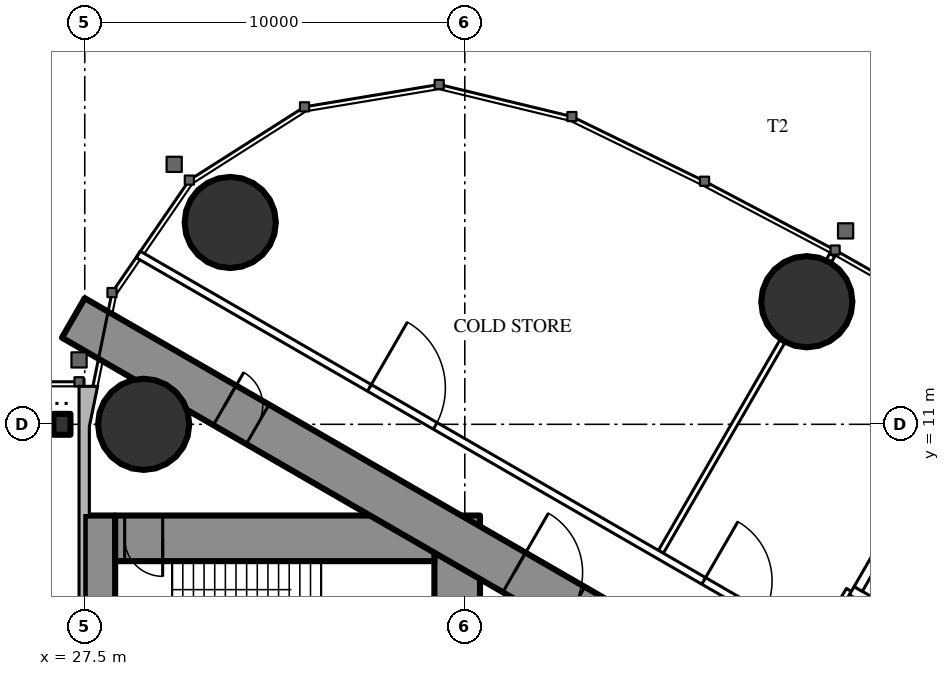
"""IFC4 building model, lengths in metres.
Left out: names, types, materials, properties, quantities, classifications, styles, units other than length and angle.
Written with IfcOpenShell. Run it as: python <this file> out.ifc"""

import sys

from ifc_helpers import new_model, si_unit, direction, frame, frame_2d, origin, origin_2d, place, context, subcontext, project, spatial, rectangle, circle, i_section, extrude, element, fill, save


model = new_model("IFC4")
c1 = context("Model", 3, precision=1e-05, world=origin(), true_north=direction((0.0, 1.0)))
c2 = subcontext(c1, "Body", "Model", "MODEL_VIEW")
j1 = project(units=[si_unit("LENGTHUNIT", "METRE"), si_unit("PLANEANGLEUNIT", "RADIAN")], contexts=[c1])
p1 = place(None, origin())
s1 = spatial("IfcSite", under=j1, at=p1, CompositionType="ELEMENT")
p2 = place(p1, origin())
s2 = spatial("IfcBuilding", under=s1, at=p2, CompositionType="ELEMENT")
p3 = place(p2, frame((0.0, 0.0, 251.9)))
s3 = spatial("IfcBuildingStorey", under=s2, at=p3, CompositionType="ELEMENT", Elevation=251.9)
for number, where, z_axis, x_axis in (
    (1, (31.328, 16.311, 0.0), (0.0, 0.0, 1.0), (1.0, 0.0, 0.0)),
    (2, (29.05, 11.0, 0.0), (0.0, 0.0, 1.0), (1.0, 0.0, 0.0)),
    (3, (46.499, 14.226, 0.0), (0.0, 0.0, 1.0), (1.0, 0.0, 0.0)),
):
    element("IfcColumn", number, at=place(p3, frame(where, z_axis=z_axis, x_axis=x_axis)), inside=s3, PredefinedType="COLUMN", context=c2, shape_type="SweptSolid", body=[
        extrude(circle(Radius=1.2, at=origin_2d()), origin(), (0.0, 0.0, 1.0), 5.4),
    ])
p4 = place(p3, frame((27.9, -8.6, 0.0), z_axis=(0.0, 0.0, 1.0), x_axis=(0.0, 1.0, 0.0)))
e4 = element("IfcWall", 4, at=p4, inside=s3, PredefinedType="SHEAR", context=c2, shape_type="SweptSolid", body=[
    extrude(rectangle(XDim=17.2, YDim=0.8, at=frame_2d((8.6, 0.0))), origin(), (0.0, 0.0, 1.0), 5.4),
])
p5 = place(p4, frame((9.35, 0.0, 0.0)))
e5 = element("IfcOpeningElement", 5, at=p5, cuts=e4, PredefinedType="OPENING", context=c2, shape_type="SweptSolid", body=[
    extrude(rectangle(XDim=0.9, YDim=2.2, at=frame_2d((0.45, 1.1))), frame((0.0, 0.41, 0.0), z_axis=(0.0, -1.0, 0.0), x_axis=(1.0, 0.0, 0.0)), (0.0, 0.0, 1.0), 0.82),
])
p6 = place(p3, frame((37.3, -8.6, 0.0), z_axis=(0.0, 0.0, 1.0), x_axis=(0.0, 1.0, 0.0)))
e6 = element("IfcWall", 6, at=p6, inside=s3, PredefinedType="SHEAR", context=c2, shape_type="SweptSolid", body=[
    extrude(rectangle(XDim=17.2, YDim=1.2, at=frame_2d((8.6, 0.0))), origin(), (0.0, 0.0, 1.0), 5.4),
])
p7 = place(p6, frame((7.7, 0.0, 0.0)))
e7 = element("IfcOpeningElement", 7, at=p7, cuts=e6, PredefinedType="OPENING", context=c2, shape_type="SweptSolid", body=[
    extrude(rectangle(XDim=1.8, YDim=2.2, at=frame_2d((0.9, 1.1))), frame((0.0, 0.61, 0.0), z_axis=(0.0, -1.0, 0.0), x_axis=(1.0, 0.0, 0.0)), (0.0, 0.0, 1.0), 1.22),
])
p8 = place(p3, frame((28.3, 8.0, 0.0), z_axis=(0.0, 0.0, 1.0), x_axis=(1.0, 0.0, 0.0)))
e8 = element("IfcWall", 8, at=p8, inside=s3, PredefinedType="SHEAR", context=c2, shape_type="SweptSolid", body=[
    extrude(rectangle(XDim=8.4, YDim=1.2, at=frame_2d((4.2, 0.0))), origin(), (0.0, 0.0, 1.0), 5.4),
])
p9 = place(p8, frame((0.25, 0.0, 0.0)))
e9 = element("IfcOpeningElement", 9, at=p9, cuts=e8, PredefinedType="OPENING", context=c2, shape_type="SweptSolid", body=[
    extrude(rectangle(XDim=1.0, YDim=2.2, at=frame_2d((0.5, 1.1))), frame((0.0, 0.61, 0.0), z_axis=(0.0, -1.0, 0.0), x_axis=(1.0, 0.0, 0.0)), (0.0, 0.0, 1.0), 1.22),
])
p10 = place(p3, frame((27.2, 13.8, 0.0), z_axis=(0.0, 0.0, 1.0), x_axis=(0.866024515034, -0.500001539357, 0.0)))
e10 = element("IfcWall", 10, at=p10, inside=s3, PredefinedType="SHEAR", context=c2, shape_type="SweptSolid", body=[
    extrude(rectangle(XDim=26.907, YDim=1.2, at=frame_2d((13.454, 0.0))), origin(), (0.0, 0.0, 1.0), 5.4),
])
p11 = place(p10, frame((4.6, 0.0, 0.0)))
e11 = element("IfcOpeningElement", 11, at=p11, cuts=e10, PredefinedType="OPENING", context=c2, shape_type="SweptSolid", body=[
    extrude(rectangle(XDim=1.0, YDim=2.2, at=frame_2d((0.5, 1.1))), frame((0.0, 0.61, 0.0), z_axis=(0.0, -1.0, 0.0), x_axis=(1.0, 0.0, 0.0)), (0.0, 0.0, 1.0), 1.22),
])
p12 = place(p10, frame((13.395, 0.0, 0.0)))
e12 = element("IfcOpeningElement", 12, at=p12, cuts=e10, PredefinedType="OPENING", context=c2, shape_type="SweptSolid", body=[
    extrude(rectangle(XDim=1.8, YDim=2.2, at=frame_2d((0.9, 1.1))), frame((0.0, 0.61, 0.0), z_axis=(0.0, -1.0, 0.0), x_axis=(1.0, 0.0, 0.0)), (0.0, 0.0, 1.0), 1.22),
])
p13 = place(p3, frame((26.9, 11.0, 0.0), z_axis=(0.0, 0.0, 1.0), x_axis=(1.0, 0.0, 0.0)))
e13 = element("IfcColumn", 13, at=p13, inside=s3, PredefinedType="COLUMN", context=c2, shape_type="SweptSolid", body=[
    extrude(i_section(OverallWidth=0.448, OverallDepth=0.55, WebThickness=0.072, FlangeThickness=0.115, FilletRadius=0.02, at=origin_2d()), origin(), (0.0, 0.0, 1.0), 5.4),
])
p14 = place(p3, frame((42.66, 7.646, 0.0), z_axis=(0.0, 0.0, 1.0), x_axis=(0.499996592859, 0.866027370889, 0.0)))
e14 = element("IfcWall", 14, at=p14, inside=s3, PredefinedType="PARTITIONING", context=c2, shape_type="SweptSolid", body=[
    extrude(rectangle(XDim=6.398, YDim=0.15, at=frame_2d((3.199, 0.0))), origin(), (0.0, 0.0, 1.0), 4.25),
])
p15 = place(p3, frame((47.079, 15.3, 0.0), z_axis=(0.0, 0.0, 1.0), x_axis=(0.499212083968, 0.866479829667, 0.0)))
e15 = element("IfcWall", 15, at=p15, inside=s3, PredefinedType="PARTITIONING", context=c2, shape_type="SweptSolid", body=[
    extrude(rectangle(XDim=0.179, YDim=0.15, at=frame_2d((0.09, 0.0))), origin(), (0.0, 0.0, 1.0), 4.25),
])
p16 = place(p3, frame((28.907, 15.47, 0.0), z_axis=(0.0, 0.0, 1.0), x_axis=(0.866026627509, -0.499997880441, 0.0)))
e16 = element("IfcWall", 16, at=p16, inside=s3, PredefinedType="PARTITIONING", context=c2, shape_type="SweptSolid", body=[
    extrude(rectangle(XDim=20.563, YDim=0.2, at=frame_2d((10.282, 0.0))), origin(), (0.0, 0.0, 1.0), 5.15),
])
p17 = place(p16, frame((17.181, 0.0, 0.0)))
e17 = element("IfcOpeningElement", 17, at=p17, cuts=e16, PredefinedType="OPENING", context=c2, shape_type="SweptSolid", body=[
    extrude(rectangle(XDim=1.8, YDim=2.2, at=frame_2d((0.9, 1.1))), frame((0.0, 0.11, 0.0), z_axis=(0.0, -1.0, 0.0), x_axis=(1.0, 0.0, 0.0)), (0.0, 0.0, 1.0), 0.22),
])
p18 = place(p16, frame((7.024, 0.0, 0.0)))
e18 = element("IfcOpeningElement", 18, at=p18, cuts=e16, PredefinedType="OPENING", context=c2, shape_type="SweptSolid", body=[
    extrude(rectangle(XDim=2.0, YDim=2.4, at=frame_2d((1.0, 1.2))), frame((0.0, 0.11, 0.0), z_axis=(0.0, -1.0, 0.0), x_axis=(1.0, 0.0, 0.0)), (0.0, 0.0, 1.0), 0.22),
])
p19 = place(p3, frame((47.606, 6.642, 0.0), z_axis=(0.0, 0.0, 1.0), x_axis=(-0.51353662755, -0.858067673418, 0.0)))
e19 = element("IfcWall", 19, at=p19, inside=s3, PredefinedType="PARTITIONING", context=c2, shape_type="SweptSolid", body=[
    extrude(rectangle(XDim=1.91, YDim=0.15, at=frame_2d((0.955, 0.0))), origin(), (0.0, 0.0, 1.0), 5.15),
])
p20 = place(p3, frame((47.681, 6.622, 0.0), z_axis=(0.0, 0.0, 1.0), x_axis=(0.86603344179, -0.499986077507, 0.0)))
e20 = element("IfcWall", 20, at=p20, inside=s3, PredefinedType="PARTITIONING", context=c2, shape_type="SweptSolid", body=[
    extrude(rectangle(XDim=6.6, YDim=0.25, at=frame_2d((3.3, 0.0))), origin(), (0.0, 0.0, 1.0), 5.15),
])
p21 = place(p3, frame((47.852, 6.668, 0.0), z_axis=(0.0, 0.0, 1.0), x_axis=(0.499929347863, 0.866066190972, 0.0)))
e21 = element("IfcWall", 21, at=p21, inside=s3, PredefinedType="PARTITIONING", context=c2, shape_type="SweptSolid", body=[
    extrude(rectangle(XDim=3.201, YDim=0.25, at=frame_2d((1.6, 0.0))), origin(), (0.0, 0.0, 1.0), 5.15),
])
p22 = place(p17, origin())
e22 = element("IfcDoor", 22, at=p22, inside=s3, OperationType="DOUBLE_DOOR_SINGLE_SWING", PredefinedType="DOOR", context=c2, shape_type="SweptSolid", body=[
    extrude(rectangle(XDim=1.8, YDim=2.2, at=frame_2d((0.9, 1.1))), frame((0.0, 0.025, 0.0), z_axis=(0.0, -1.0, 0.0), x_axis=(1.0, 0.0, 0.0)), (0.0, 0.0, 1.0), 0.05),
])
fill(e17, e22)
p23 = place(p18, origin())
e23 = element("IfcDoor", 23, at=p23, inside=s3, OperationType="DOUBLE_DOOR_SINGLE_SWING", PredefinedType="DOOR", context=c2, shape_type="SweptSolid", body=[
    extrude(rectangle(XDim=2.0, YDim=2.4, at=frame_2d((1.0, 1.2))), frame((0.0, 0.025, 0.0), z_axis=(0.0, -1.0, 0.0), x_axis=(1.0, 0.0, 0.0)), (0.0, 0.0, 1.0), 0.05),
])
fill(e18, e23)
p24 = place(p11, origin())
e24 = element("IfcDoor", 24, at=p24, inside=s3, OperationType="SINGLE_SWING_LEFT", PredefinedType="DOOR", context=c2, shape_type="SweptSolid", body=[
    extrude(rectangle(XDim=1.0, YDim=2.2, at=frame_2d((0.5, 1.1))), frame((0.0, 0.025, 0.0), z_axis=(0.0, -1.0, 0.0), x_axis=(1.0, 0.0, 0.0)), (0.0, 0.0, 1.0), 0.05),
])
fill(e11, e24)
p25 = place(p12, origin())
e25 = element("IfcDoor", 25, at=p25, inside=s3, OperationType="DOUBLE_DOOR_SINGLE_SWING", PredefinedType="DOOR", context=c2, shape_type="SweptSolid", body=[
    extrude(rectangle(XDim=1.8, YDim=2.2, at=frame_2d((0.9, 1.1))), frame((0.0, 0.025, 0.0), z_axis=(0.0, -1.0, 0.0), x_axis=(1.0, 0.0, 0.0)), (0.0, 0.0, 1.0), 0.05),
])
fill(e12, e25)
p26 = place(p9, origin())
e26 = element("IfcDoor", 26, at=p26, inside=s3, OperationType="SINGLE_SWING_RIGHT", PredefinedType="DOOR", context=c2, shape_type="SweptSolid", body=[
    extrude(rectangle(XDim=1.0, YDim=2.2, at=frame_2d((0.5, 1.1))), frame((0.0, 0.025, 0.0), z_axis=(0.0, -1.0, 0.0), x_axis=(1.0, 0.0, 0.0)), (0.0, 0.0, 1.0), 0.05),
])
fill(e9, e26)
save(model, sys.argv[1])
